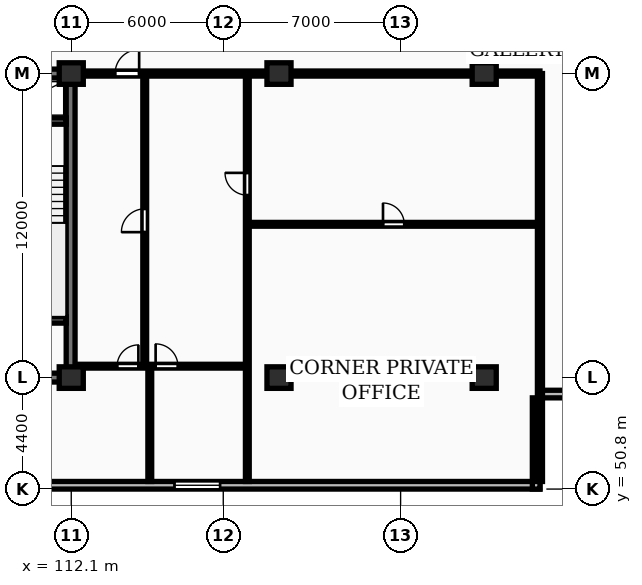
"""IFC4 building model, lengths in metres.
Left out: names, types, materials, properties, quantities, classifications, styles, units other than length and angle.
Written with IfcOpenShell. Run it as: python <this file> out.ifc"""

import sys

from ifc_helpers import new_model, si_unit, direction, frame, frame_2d, origin, origin_2d, place, context, subcontext, project, spatial, rectangle, extrude, element, fill, save


model = new_model("IFC4")
c1 = context("Model", 3, precision=1e-05, world=origin(), true_north=direction((0.0, 1.0)))
c2 = subcontext(c1, "Body", "Model", "MODEL_VIEW")
j1 = project(units=[si_unit("LENGTHUNIT", "METRE"), si_unit("PLANEANGLEUNIT", "RADIAN")], contexts=[c1])
p1 = place(None, origin())
s1 = spatial("IfcSite", under=j1, at=p1, CompositionType="ELEMENT")
p2 = place(p1, origin())
s2 = spatial("IfcBuilding", under=s1, at=p2, CompositionType="ELEMENT")
p3 = place(p2, frame((0.0, 0.0, 106.8)))
s3 = spatial("IfcBuildingStorey", under=s2, at=p3, CompositionType="ELEMENT", Elevation=106.8)
for number, where, z_axis, x_axis in (
    (1, (112.1, 55.2, 0.0), (0.0, 0.0, 1.0), (1.0, 0.0, 0.0)),
    (2, (112.1, 67.2, 0.0), (0.0, 0.0, 1.0), (1.0, 0.0, 0.0)),
    (3, (120.3, 55.2, 0.0), (0.0, 0.0, 1.0), (1.0, 0.0, 0.0)),
    (4, (120.3, 67.2, 0.0), (0.0, 0.0, 1.0), (1.0, 0.0, 0.0)),
    (5, (128.4, 55.2, 0.0), (0.0, 0.0, 1.0), (1.0, 0.0, 0.0)),
    (6, (128.4, 67.2, 0.0), (0.0, 0.0, 1.0), (1.0, 0.0, 0.0)),
):
    element("IfcColumn", number, at=place(p3, frame(where, z_axis=z_axis, x_axis=x_axis)), inside=s3, PredefinedType="COLUMN", context=c2, shape_type="SweptSolid", body=[
        extrude(rectangle(XDim=0.95, YDim=0.85, at=origin_2d()), origin(), (0.0, 0.0, 1.0), 3.25),
    ])
p4 = place(p3, frame((57.6, 50.95, 0.0), z_axis=(0.0, 0.0, 1.0), x_axis=(1.0, 0.0, 0.0)))
e7 = element("IfcWall", 7, at=p4, inside=s3, PredefinedType="STANDARD", context=c2, shape_type="SweptSolid", body=[
    extrude(rectangle(XDim=73.0, YDim=0.3, at=frame_2d((36.5, 0.0))), origin(), (0.0, 0.0, 1.0), 2.97),
])
p5 = place(p4, frame((15.225, 0.0, 0.85)))
e8 = element("IfcOpeningElement", 8, at=p5, cuts=e7, PredefinedType="OPENING", context=c2, shape_type="SweptSolid", body=[
    extrude(rectangle(XDim=1.8, YDim=1.8, at=frame_2d((0.9, 0.9))), frame((0.0, 0.16, 0.0), z_axis=(0.0, -1.0, 0.0), x_axis=(1.0, 0.0, 0.0)), (0.0, 0.0, 1.0), 0.32),
])
p6 = place(p4, frame((58.575, 0.0, 0.85)))
e9 = element("IfcOpeningElement", 9, at=p6, cuts=e7, PredefinedType="OPENING", context=c2, shape_type="SweptSolid", body=[
    extrude(rectangle(XDim=1.8, YDim=1.8, at=frame_2d((0.9, 0.9))), frame((0.0, 0.16, 0.0), z_axis=(0.0, -1.0, 0.0), x_axis=(1.0, 0.0, 0.0)), (0.0, 0.0, 1.0), 0.32),
])
for number, where, z_axis, x_axis in (
    (10, (130.45, 50.8, 0.0), (0.0, 0.0, 1.0), (0.0, 1.0, 0.0)),
    (11, (130.6, 54.55, 0.0), (0.0, 0.0, 1.0), (1.0, 0.0, 0.0)),
):
    element("IfcWall", number, at=place(p3, frame(where, z_axis=z_axis, x_axis=x_axis)), inside=s3, PredefinedType="STANDARD", context=c2, shape_type="SweptSolid", body=[
        extrude(rectangle(XDim=3.6, YDim=0.3, at=frame_2d((1.8, 0.0))), origin(), (0.0, 0.0, 1.0), 2.97),
    ])
p7 = place(p3, frame((75.95, 55.2, 0.0), z_axis=(0.0, 0.0, 1.0), x_axis=(1.0, 0.0, 0.0)))
e12 = element("IfcWall", 12, at=p7, inside=s3, PredefinedType="SHEAR", context=c2, shape_type="SweptSolid", body=[
    extrude(rectangle(XDim=36.3, YDim=0.35, at=frame_2d((18.15, 0.0))), origin(), (0.0, 0.0, 1.0), 3.25),
])
p8 = place(p3, frame((112.075, 55.375, 0.0), z_axis=(0.0, 0.0, 1.0), x_axis=(0.0, 1.0, 0.0)))
e13 = element("IfcWall", 13, at=p8, inside=s3, PredefinedType="SHEAR", context=c2, shape_type="SweptSolid", body=[
    extrude(rectangle(XDim=11.65, YDim=0.35, at=frame_2d((5.825, 0.0))), origin(), (0.0, 0.0, 1.0), 3.25),
])
p9 = place(p3, frame((75.95, 67.2, 0.0), z_axis=(0.0, 0.0, 1.0), x_axis=(1.0, 0.0, 0.0)))
e14 = element("IfcWall", 14, at=p9, inside=s3, PredefinedType="SHEAR", context=c2, shape_type="SweptSolid", body=[
    extrude(rectangle(XDim=36.3, YDim=0.35, at=frame_2d((18.15, 0.0))), origin(), (0.0, 0.0, 1.0), 3.25),
])
p10 = place(p9, frame((5.25, 0.0, 0.0)))
e15 = element("IfcOpeningElement", 15, at=p10, cuts=e14, PredefinedType="OPENING", context=c2, shape_type="SweptSolid", body=[
    extrude(rectangle(XDim=1.0, YDim=2.15, at=frame_2d((0.5, 1.075))), frame((0.0, 0.185, 0.0), z_axis=(0.0, -1.0, 0.0), x_axis=(1.0, 0.0, 0.0)), (0.0, 0.0, 1.0), 0.37),
])
p11 = place(p9, frame((21.6, 0.0, 0.0)))
e16 = element("IfcOpeningElement", 16, at=p11, cuts=e14, PredefinedType="OPENING", context=c2, shape_type="SweptSolid", body=[
    extrude(rectangle(XDim=1.5, YDim=2.2, at=frame_2d((0.75, 1.1))), frame((0.0, 0.185, 0.0), z_axis=(0.0, -1.0, 0.0), x_axis=(1.0, 0.0, 0.0)), (0.0, 0.0, 1.0), 0.37),
])
p12 = place(p9, frame((30.45, 0.0, 0.0)))
e17 = element("IfcOpeningElement", 17, at=p12, cuts=e14, PredefinedType="OPENING", context=c2, shape_type="SweptSolid", body=[
    extrude(rectangle(XDim=1.0, YDim=2.15, at=frame_2d((0.5, 1.075))), frame((0.0, 0.185, 0.0), z_axis=(0.0, -1.0, 0.0), x_axis=(1.0, 0.0, 0.0)), (0.0, 0.0, 1.0), 0.37),
])
for number, where, z_axis, x_axis in (
    (18, (108.66, 57.475, 0.0), (0.0, 0.0, 1.0), (1.0, 0.0, 0.0)),
    (19, (108.66, 65.325, 0.0), (0.0, 0.0, 1.0), (1.0, 0.0, 0.0)),
):
    element("IfcWall", number, at=place(p3, frame(where, z_axis=z_axis, x_axis=x_axis)), inside=s3, PredefinedType="SHEAR", context=c2, shape_type="SweptSolid", body=[
        extrude(rectangle(XDim=3.24, YDim=0.25, at=frame_2d((1.62, 0.0))), origin(), (0.0, 0.0, 1.0), 3.25),
    ])
p13 = place(p3, frame((130.6, 51.1, 0.0), z_axis=(0.0, 0.0, 1.0), x_axis=(0.0, 1.0, 0.0)))
e20 = element("IfcWall", 20, at=p13, inside=s3, PredefinedType="PARTITIONING", context=c2, shape_type="SweptSolid", body=[
    extrude(rectangle(XDim=16.1, YDim=0.2, at=frame_2d((8.05, 0.0))), origin(), (0.0, 0.0, 1.0), 2.97),
])
p14 = place(p3, frame((119.05, 61.25, 0.0), z_axis=(0.0, 0.0, 1.0), x_axis=(1.0, 0.0, 0.0)))
e21 = element("IfcWall", 21, at=p14, inside=s3, PredefinedType="PARTITIONING", context=c2, shape_type="SweptSolid", body=[
    extrude(rectangle(XDim=11.55, YDim=0.15, at=frame_2d((5.775, 0.0))), origin(), (0.0, 0.0, 1.0), 2.97),
])
p15 = place(p14, frame((5.355, 0.0, 0.0)))
e22 = element("IfcOpeningElement", 22, at=p15, cuts=e21, PredefinedType="OPENING", context=c2, shape_type="SweptSolid", body=[
    extrude(rectangle(XDim=0.84, YDim=2.04, at=frame_2d((0.42, 1.02))), frame((0.0, 0.085, 0.0), z_axis=(0.0, -1.0, 0.0), x_axis=(1.0, 0.0, 0.0)), (0.0, 0.0, 1.0), 0.17),
])
p16 = place(p3, frame((119.05, 51.1, 0.0), z_axis=(0.0, 0.0, 1.0), x_axis=(0.0, 1.0, 0.0)))
e23 = element("IfcWall", 23, at=p16, inside=s3, PredefinedType="PARTITIONING", context=c2, shape_type="SweptSolid", body=[
    extrude(rectangle(XDim=16.05, YDim=0.15, at=frame_2d((8.025, 0.0))), origin(), (0.0, 0.0, 1.0), 2.97),
])
p17 = place(p16, frame((11.3, 0.0, 0.0)))
e24 = element("IfcOpeningElement", 24, at=p17, cuts=e23, PredefinedType="OPENING", context=c2, shape_type="SweptSolid", body=[
    extrude(rectangle(XDim=0.88, YDim=2.06, at=frame_2d((0.44, 1.03))), frame((0.0, 0.085, 0.0), z_axis=(0.0, -1.0, 0.0), x_axis=(1.0, 0.0, 0.0)), (0.0, 0.0, 1.0), 0.17),
])
p18 = place(p3, frame((115.0, 55.65, 0.0), z_axis=(0.0, 0.0, 1.0), x_axis=(0.0, 1.0, 0.0)))
e25 = element("IfcWall", 25, at=p18, inside=s3, PredefinedType="PARTITIONING", context=c2, shape_type="SweptSolid", body=[
    extrude(rectangle(XDim=11.5, YDim=0.15, at=frame_2d((5.75, 0.0))), origin(), (0.0, 0.0, 1.0), 2.97),
])
p19 = place(p18, frame((5.29, 0.0, 0.0)))
e26 = element("IfcOpeningElement", 26, at=p19, cuts=e25, PredefinedType="OPENING", context=c2, shape_type="SweptSolid", body=[
    extrude(rectangle(XDim=0.92, YDim=2.08, at=frame_2d((0.46, 1.04))), frame((0.0, 0.085, 0.0), z_axis=(0.0, -1.0, 0.0), x_axis=(1.0, 0.0, 0.0)), (0.0, 0.0, 1.0), 0.17),
])
p20 = place(p3, frame((115.2, 51.1, 0.0), z_axis=(0.0, 0.0, 1.0), x_axis=(0.0, 1.0, 0.0)))
e27 = element("IfcWall", 27, at=p20, inside=s3, PredefinedType="PARTITIONING", context=c2, shape_type="SweptSolid", body=[
    extrude(rectangle(XDim=4.55, YDim=0.15, at=frame_2d((2.275, 0.0))), origin(), (0.0, 0.0, 1.0), 2.97),
])
p21 = place(p3, frame((112.27, 55.65, 0.0), z_axis=(0.0, 0.0, 1.0), x_axis=(1.0, 0.0, 0.0)))
e28 = element("IfcWall", 28, at=p21, inside=s3, PredefinedType="PARTITIONING", context=c2, shape_type="SweptSolid", body=[
    extrude(rectangle(XDim=6.76, YDim=0.15, at=frame_2d((3.38, 0.0))), origin(), (0.0, 0.0, 1.0), 2.97),
])
p22 = place(p21, frame((1.64, 0.0, 0.0)))
e29 = element("IfcOpeningElement", 29, at=p22, cuts=e28, PredefinedType="OPENING", context=c2, shape_type="SweptSolid", body=[
    extrude(rectangle(XDim=0.84, YDim=2.04, at=frame_2d((0.42, 1.02))), frame((0.0, 0.085, 0.0), z_axis=(0.0, -1.0, 0.0), x_axis=(1.0, 0.0, 0.0)), (0.0, 0.0, 1.0), 0.17),
])
p23 = place(p21, frame((3.16, 0.0, 0.0)))
e30 = element("IfcOpeningElement", 30, at=p23, cuts=e28, PredefinedType="OPENING", context=c2, shape_type="SweptSolid", body=[
    extrude(rectangle(XDim=0.88, YDim=2.06, at=frame_2d((0.44, 1.03))), frame((0.0, 0.085, 0.0), z_axis=(0.0, -1.0, 0.0), x_axis=(1.0, 0.0, 0.0)), (0.0, 0.0, 1.0), 0.17),
])
p24 = place(p3, frame((112.25, 67.2, 0.0), z_axis=(0.0, 0.0, 1.0), x_axis=(1.0, 0.0, 0.0)))
e31 = element("IfcWall", 31, at=p24, inside=s3, PredefinedType="PARTITIONING", context=c2, shape_type="SweptSolid", body=[
    extrude(rectangle(XDim=18.35, YDim=0.2, at=frame_2d((9.175, 0.0))), origin(), (0.0, 0.0, 1.0), 2.433),
])
p25 = place(p24, frame((1.58, 0.0, 0.0)))
e32 = element("IfcOpeningElement", 32, at=p25, cuts=e31, PredefinedType="OPENING", context=c2, shape_type="SweptSolid", body=[
    extrude(rectangle(XDim=0.95, YDim=2.15, at=frame_2d((0.475, 1.075))), frame((0.0, 0.11, 0.0), z_axis=(0.0, -1.0, 0.0), x_axis=(1.0, 0.0, 0.0)), (0.0, 0.0, 1.0), 0.22),
])
p26 = place(p6, origin())
e33 = element("IfcWindow", 33, at=p26, inside=s3, PartitioningType="SINGLE_PANEL", PredefinedType="WINDOW", context=c2, shape_type="SweptSolid", body=[
    extrude(rectangle(XDim=1.8, YDim=1.8, at=frame_2d((0.9, 0.9))), frame((0.0, 0.03, 0.0), z_axis=(0.0, -1.0, 0.0), x_axis=(1.0, 0.0, 0.0)), (0.0, 0.0, 1.0), 0.06),
])
fill(e9, e33)
p27 = place(p15, origin())
e34 = element("IfcDoor", 34, at=p27, inside=s3, OperationType="SINGLE_SWING_LEFT", PredefinedType="DOOR", context=c2, shape_type="SweptSolid", body=[
    extrude(rectangle(XDim=0.84, YDim=2.04, at=frame_2d((0.42, 1.02))), frame((0.0, 0.025, 0.0), z_axis=(0.0, -1.0, 0.0), x_axis=(1.0, 0.0, 0.0)), (0.0, 0.0, 1.0), 0.05),
])
fill(e22, e34)
p28 = place(p17, origin())
e35 = element("IfcDoor", 35, at=p28, inside=s3, OperationType="SINGLE_SWING_RIGHT", PredefinedType="DOOR", context=c2, shape_type="SweptSolid", body=[
    extrude(rectangle(XDim=0.88, YDim=2.06, at=frame_2d((0.44, 1.03))), frame((0.0, 0.025, 0.0), z_axis=(0.0, -1.0, 0.0), x_axis=(1.0, 0.0, 0.0)), (0.0, 0.0, 1.0), 0.05),
])
fill(e24, e35)
p29 = place(p19, origin())
e36 = element("IfcDoor", 36, at=p29, inside=s3, OperationType="SINGLE_SWING_LEFT", PredefinedType="DOOR", context=c2, shape_type="SweptSolid", body=[
    extrude(rectangle(XDim=0.92, YDim=2.08, at=frame_2d((0.46, 1.04))), frame((0.0, 0.025, 0.0), z_axis=(0.0, -1.0, 0.0), x_axis=(1.0, 0.0, 0.0)), (0.0, 0.0, 1.0), 0.05),
])
fill(e26, e36)
p30 = place(p22, origin())
e37 = element("IfcDoor", 37, at=p30, inside=s3, OperationType="SINGLE_SWING_RIGHT", PredefinedType="DOOR", context=c2, shape_type="SweptSolid", body=[
    extrude(rectangle(XDim=0.84, YDim=2.04, at=frame_2d((0.42, 1.02))), frame((0.0, 0.025, 0.0), z_axis=(0.0, -1.0, 0.0), x_axis=(1.0, 0.0, 0.0)), (0.0, 0.0, 1.0), 0.05),
])
fill(e29, e37)
p31 = place(p23, origin())
e38 = element("IfcDoor", 38, at=p31, inside=s3, OperationType="SINGLE_SWING_LEFT", PredefinedType="DOOR", context=c2, shape_type="SweptSolid", body=[
    extrude(rectangle(XDim=0.88, YDim=2.06, at=frame_2d((0.44, 1.03))), frame((0.0, 0.025, 0.0), z_axis=(0.0, -1.0, 0.0), x_axis=(1.0, 0.0, 0.0)), (0.0, 0.0, 1.0), 0.05),
])
fill(e30, e38)
p32 = place(p25, origin())
e39 = element("IfcDoor", 39, at=p32, inside=s3, OperationType="SINGLE_SWING_RIGHT", PredefinedType="DOOR", context=c2, shape_type="SweptSolid", body=[
    extrude(rectangle(XDim=0.95, YDim=2.15, at=frame_2d((0.475, 1.075))), frame((0.0, 0.025, 0.0), z_axis=(0.0, -1.0, 0.0), x_axis=(1.0, 0.0, 0.0)), (0.0, 0.0, 1.0), 0.05),
])
fill(e32, e39)
save(model, sys.argv[1])
